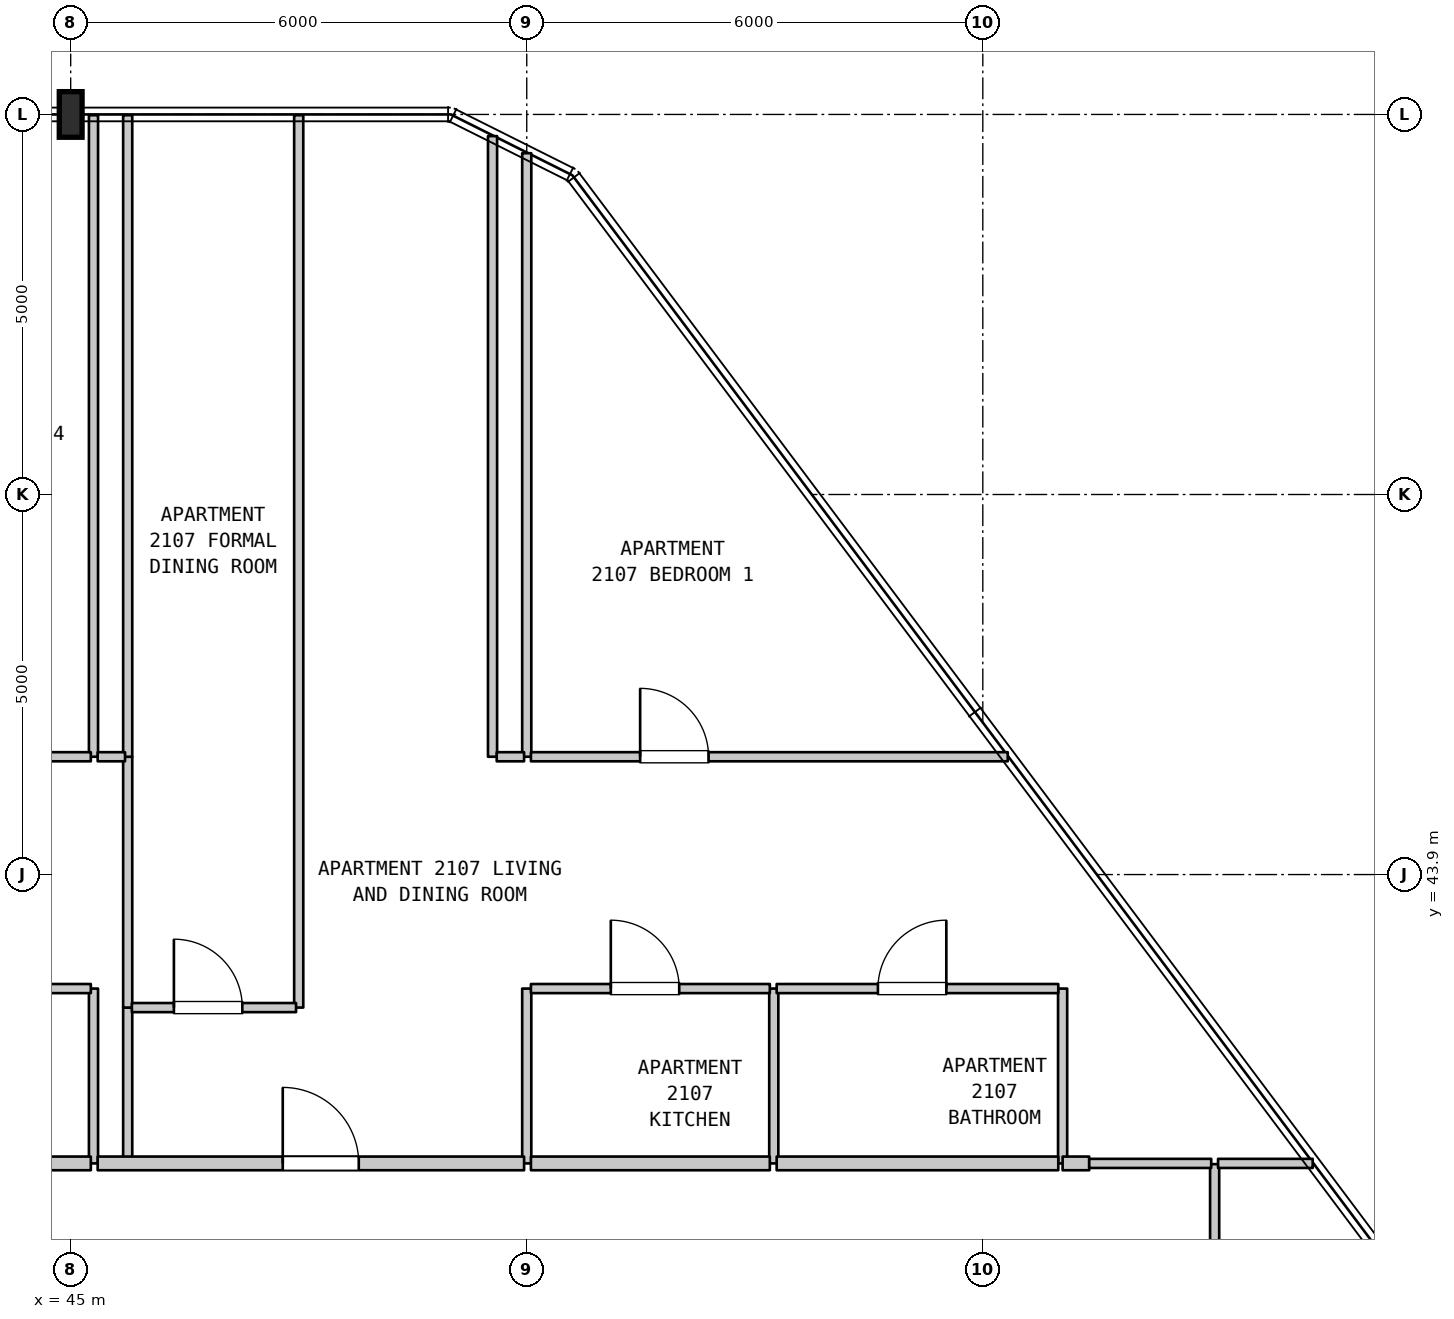
"""IFC4 building model, lengths in metres.
Left out: names, types, materials, properties, quantities, classifications, styles, units other than length and angle.
Written with IfcOpenShell. Run it as: python <this file> out.ifc"""

import sys

from ifc_helpers import new_model, si_unit, direction, frame, frame_2d, origin, origin_2d, place, context, subcontext, project, spatial, rectangle, i_section, extrude, element, fill, save


model = new_model("IFC4")
c1 = context("Model", 3, precision=1e-05, world=origin(), true_north=direction((0.0, 1.0)))
c2 = subcontext(c1, "Body", "Model", "MODEL_VIEW")
j1 = project(units=[si_unit("LENGTHUNIT", "METRE"), si_unit("PLANEANGLEUNIT", "RADIAN")], contexts=[c1])
p1 = place(None, origin())
s1 = spatial("IfcSite", under=j1, at=p1, CompositionType="ELEMENT")
p2 = place(p1, origin())
s2 = spatial("IfcBuilding", under=s1, at=p2, CompositionType="ELEMENT")
p3 = place(p2, frame((0.0, 0.0, 90.9)))
s3 = spatial("IfcBuildingStorey", under=s2, at=p3, CompositionType="ELEMENT", Elevation=90.9)
p4 = place(p3, frame((45.0, 53.9, 0.0), z_axis=(0.0, 0.0, 1.0), x_axis=(1.0, 0.0, 0.0)))
e1 = element("IfcColumn", 1, at=p4, inside=s3, PredefinedType="COLUMN", context=c2, shape_type="SweptSolid", body=[
    extrude(i_section(OverallWidth=0.3, OverallDepth=0.6, WebThickness=0.015, FlangeThickness=0.03, FilletRadius=0.027, at=origin_2d()), origin(), (0.0, 0.0, 1.0), 3.7),
])
p5 = place(p3, frame((45.3, 40.1, 0.0), z_axis=(0.0, 0.0, 1.0), x_axis=(0.0, 1.0, 0.0)))
e2 = element("IfcWall", 2, at=p5, inside=s3, PredefinedType="PARTITIONING", context=c2, shape_type="SweptSolid", body=[
    extrude(rectangle(XDim=2.3, YDim=0.12, at=frame_2d((1.15, 0.0))), origin(), (0.0, 0.0, 1.0), 3.385),
])
p6 = place(p3, frame((45.3, 45.45, 0.0), z_axis=(0.0, 0.0, 1.0), x_axis=(0.0, 1.0, 0.0)))
e3 = element("IfcWall", 3, at=p6, inside=s3, PredefinedType="PARTITIONING", context=c2, shape_type="SweptSolid", body=[
    extrude(rectangle(XDim=8.44, YDim=0.12, at=frame_2d((4.22, 0.0))), origin(), (0.0, 0.0, 1.0), 3.385),
])
p7 = place(p3, frame((45.75, 40.1, 0.0), z_axis=(0.0, 0.0, 1.0), x_axis=(0.0, 1.0, 0.0)))
e4 = element("IfcWall", 4, at=p7, inside=s3, PredefinedType="PARTITIONING", context=c2, shape_type="SweptSolid", body=[
    extrude(rectangle(XDim=2.05, YDim=0.12, at=frame_2d((1.025, 0.0))), origin(), (0.0, 0.0, 1.0), 3.385),
])
p8 = place(p3, frame((45.75, 42.15, 0.0), z_axis=(0.0, 0.0, 1.0), x_axis=(0.0, 1.0, 0.0)))
e5 = element("IfcWall", 5, at=p8, inside=s3, PredefinedType="PARTITIONING", context=c2, shape_type="SweptSolid", body=[
    extrude(rectangle(XDim=3.3, YDim=0.12, at=frame_2d((1.65, 0.0))), origin(), (0.0, 0.0, 1.0), 3.385),
])
p9 = place(p3, frame((45.75, 45.45, 0.0), z_axis=(0.0, 0.0, 1.0), x_axis=(0.0, 1.0, 0.0)))
e6 = element("IfcWall", 6, at=p9, inside=s3, PredefinedType="PARTITIONING", context=c2, shape_type="SweptSolid", body=[
    extrude(rectangle(XDim=8.44, YDim=0.12, at=frame_2d((4.22, 0.0))), origin(), (0.0, 0.0, 1.0), 3.385),
])
p10 = place(p3, frame((48.0, 42.15, 0.0), z_axis=(0.0, 0.0, 1.0), x_axis=(0.0, 1.0, 0.0)))
e7 = element("IfcWall", 7, at=p10, inside=s3, PredefinedType="PARTITIONING", context=c2, shape_type="SweptSolid", body=[
    extrude(rectangle(XDim=11.74, YDim=0.12, at=frame_2d((5.87, 0.0))), origin(), (0.0, 0.0, 1.0), 3.385),
])
p11 = place(p3, frame((50.55, 45.45, 0.0), z_axis=(0.0, 0.0, 1.0), x_axis=(0.0, 1.0, 0.0)))
e8 = element("IfcWall", 8, at=p11, inside=s3, PredefinedType="PARTITIONING", context=c2, shape_type="SweptSolid", body=[
    extrude(rectangle(XDim=8.165, YDim=0.12, at=frame_2d((4.083, 0.0))), origin(), (0.0, 0.0, 1.0), 3.385),
])
p12 = place(p3, frame((51.0, 40.1, 0.0), z_axis=(0.0, 0.0, 1.0), x_axis=(0.0, 1.0, 0.0)))
e9 = element("IfcWall", 9, at=p12, inside=s3, PredefinedType="PARTITIONING", context=c2, shape_type="SweptSolid", body=[
    extrude(rectangle(XDim=2.3, YDim=0.12, at=frame_2d((1.15, 0.0))), origin(), (0.0, 0.0, 1.0), 3.385),
])
p13 = place(p3, frame((51.0, 45.45, 0.0), z_axis=(0.0, 0.0, 1.0), x_axis=(0.0, 1.0, 0.0)))
e10 = element("IfcWall", 10, at=p13, inside=s3, PredefinedType="PARTITIONING", context=c2, shape_type="SweptSolid", body=[
    extrude(rectangle(XDim=7.94, YDim=0.12, at=frame_2d((3.97, 0.0))), origin(), (0.0, 0.0, 1.0), 3.385),
])
for number, where, z_axis, x_axis in (
    (11, (54.25, 40.1, 0.0), (0.0, 0.0, 1.0), (0.0, 1.0, 0.0)),
    (12, (58.05, 40.1, 0.0), (0.0, 0.0, 1.0), (0.0, 1.0, 0.0)),
):
    element("IfcWall", number, at=place(p3, frame(where, z_axis=z_axis, x_axis=x_axis)), inside=s3, PredefinedType="PARTITIONING", context=c2, shape_type="SweptSolid", body=[
        extrude(rectangle(XDim=2.3, YDim=0.12, at=frame_2d((1.15, 0.0))), origin(), (0.0, 0.0, 1.0), 3.385),
    ])
p14 = place(p3, frame((60.05, 37.89, 0.0), z_axis=(0.0, 0.0, 1.0), x_axis=(0.0, 1.0, 0.0)))
e13 = element("IfcWall", 13, at=p14, inside=s3, PredefinedType="PARTITIONING", context=c2, shape_type="SweptSolid", body=[
    extrude(rectangle(XDim=2.2, YDim=0.12, at=frame_2d((1.1, 0.0))), origin(), (0.0, 0.0, 1.0), 3.385),
])
p15 = place(p3, frame((40.311, 40.1, 0.0), z_axis=(0.0, 0.0, 1.0), x_axis=(1.0, 0.0, 0.0)))
e14 = element("IfcWall", 14, at=p15, inside=s3, PredefinedType="STANDARD", context=c2, shape_type="SweptSolid", body=[
    extrude(rectangle(XDim=4.954, YDim=0.18, at=frame_2d((2.477, 0.0))), origin(), (0.0, 0.0, 1.0), 3.385),
])
p16 = place(p3, frame((45.355, 40.1, 0.0), z_axis=(0.0, 0.0, 1.0), x_axis=(1.0, 0.0, 0.0)))
e15 = element("IfcWall", 15, at=p16, inside=s3, PredefinedType="STANDARD", context=c2, shape_type="SweptSolid", body=[
    extrude(rectangle(XDim=5.61, YDim=0.18, at=frame_2d((2.805, 0.0))), origin(), (0.0, 0.0, 1.0), 3.385),
])
p17 = place(p16, frame((2.435, 0.0, 0.0)))
e16 = element("IfcOpeningElement", 16, at=p17, cuts=e15, PredefinedType="OPENING", context=c2, shape_type="SweptSolid", body=[
    extrude(rectangle(XDim=1.0, YDim=2.15, at=frame_2d((0.5, 1.075))), frame((0.0, 0.1, 0.0), z_axis=(0.0, -1.0, 0.0), x_axis=(1.0, 0.0, 0.0)), (0.0, 0.0, 1.0), 0.2),
])
p18 = place(p3, frame((51.055, 40.1, 0.0), z_axis=(0.0, 0.0, 1.0), x_axis=(1.0, 0.0, 0.0)))
e17 = element("IfcWall", 17, at=p18, inside=s3, PredefinedType="STANDARD", context=c2, shape_type="SweptSolid", body=[
    extrude(rectangle(XDim=3.143, YDim=0.18, at=frame_2d((1.572, 0.0))), origin(), (0.0, 0.0, 1.0), 3.385),
])
p19 = place(p3, frame((54.288, 40.1, 0.0), z_axis=(0.0, 0.0, 1.0), x_axis=(1.0, 0.0, 0.0)))
e18 = element("IfcWall", 18, at=p19, inside=s3, PredefinedType="STANDARD", context=c2, shape_type="SweptSolid", body=[
    extrude(rectangle(XDim=3.705, YDim=0.18, at=frame_2d((1.853, 0.0))), origin(), (0.0, 0.0, 1.0), 3.385),
])
p20 = place(p3, frame((58.05, 40.1, 0.0), z_axis=(0.0, 0.0, 1.0), x_axis=(1.0, 0.0, 0.0)))
e19 = element("IfcWall", 19, at=p20, inside=s3, PredefinedType="STANDARD", context=c2, shape_type="SweptSolid", body=[
    extrude(rectangle(XDim=0.35, YDim=0.18, at=frame_2d((0.175, 0.0))), origin(), (0.0, 0.0, 1.0), 3.385),
])
p21 = place(p3, frame((58.4, 40.1, 0.0), z_axis=(0.0, 0.0, 1.0), x_axis=(1.0, 0.0, 0.0)))
e20 = element("IfcWall", 20, at=p21, inside=s3, PredefinedType="PARTITIONING", context=c2, shape_type="SweptSolid", body=[
    extrude(rectangle(XDim=1.605, YDim=0.12, at=frame_2d((0.802, 0.0))), origin(), (0.0, 0.0, 1.0), 3.385),
])
p22 = place(p3, frame((60.095, 40.1, 0.0), z_axis=(0.0, 0.0, 1.0), x_axis=(1.0, 0.0, 0.0)))
e21 = element("IfcWall", 21, at=p22, inside=s3, PredefinedType="PARTITIONING", context=c2, shape_type="SweptSolid", body=[
    extrude(rectangle(XDim=1.245, YDim=0.12, at=frame_2d((0.623, 0.0))), origin(), (0.0, 0.0, 1.0), 3.385),
])
p23 = place(p3, frame((45.805, 42.15, 0.0), z_axis=(0.0, 0.0, 1.0), x_axis=(1.0, 0.0, 0.0)))
e22 = element("IfcWall", 22, at=p23, inside=s3, PredefinedType="PARTITIONING", context=c2, shape_type="SweptSolid", body=[
    extrude(rectangle(XDim=2.16, YDim=0.12, at=frame_2d((1.08, 0.0))), origin(), (0.0, 0.0, 1.0), 3.385),
])
p24 = place(p23, frame((0.553, 0.0, 0.0)))
e23 = element("IfcOpeningElement", 23, at=p24, cuts=e22, PredefinedType="OPENING", context=c2, shape_type="SweptSolid", body=[
    extrude(rectangle(XDim=0.9, YDim=2.15, at=frame_2d((0.45, 1.075))), frame((0.0, 0.07, 0.0), z_axis=(0.0, -1.0, 0.0), x_axis=(1.0, 0.0, 0.0)), (0.0, 0.0, 1.0), 0.14),
])
p25 = place(p3, frame((40.311, 42.4, 0.0), z_axis=(0.0, 0.0, 1.0), x_axis=(1.0, 0.0, 0.0)))
e24 = element("IfcWall", 24, at=p25, inside=s3, PredefinedType="PARTITIONING", context=c2, shape_type="SweptSolid", body=[
    extrude(rectangle(XDim=4.954, YDim=0.12, at=frame_2d((2.477, 0.0))), origin(), (0.0, 0.0, 1.0), 3.385),
])
p26 = place(p25, frame((2.027, 0.0, 0.0)))
e25 = element("IfcOpeningElement", 25, at=p26, cuts=e24, PredefinedType="OPENING", context=c2, shape_type="SweptSolid", body=[
    extrude(rectangle(XDim=0.9, YDim=2.15, at=frame_2d((0.45, 1.075))), frame((0.0, 0.07, 0.0), z_axis=(0.0, -1.0, 0.0), x_axis=(1.0, 0.0, 0.0)), (0.0, 0.0, 1.0), 0.14),
])
p27 = place(p3, frame((51.055, 42.4, 0.0), z_axis=(0.0, 0.0, 1.0), x_axis=(1.0, 0.0, 0.0)))
e26 = element("IfcWall", 26, at=p27, inside=s3, PredefinedType="PARTITIONING", context=c2, shape_type="SweptSolid", body=[
    extrude(rectangle(XDim=3.143, YDim=0.12, at=frame_2d((1.572, 0.0))), origin(), (0.0, 0.0, 1.0), 3.385),
])
p28 = place(p27, frame((1.051, 0.0, 0.0)))
e27 = element("IfcOpeningElement", 27, at=p28, cuts=e26, PredefinedType="OPENING", context=c2, shape_type="SweptSolid", body=[
    extrude(rectangle(XDim=0.9, YDim=2.15, at=frame_2d((0.45, 1.075))), frame((0.0, 0.07, 0.0), z_axis=(0.0, -1.0, 0.0), x_axis=(1.0, 0.0, 0.0)), (0.0, 0.0, 1.0), 0.14),
])
p29 = place(p3, frame((54.288, 42.4, 0.0), z_axis=(0.0, 0.0, 1.0), x_axis=(1.0, 0.0, 0.0)))
e28 = element("IfcWall", 28, at=p29, inside=s3, PredefinedType="PARTITIONING", context=c2, shape_type="SweptSolid", body=[
    extrude(rectangle(XDim=3.705, YDim=0.12, at=frame_2d((1.853, 0.0))), origin(), (0.0, 0.0, 1.0), 3.385),
])
p30 = place(p29, frame((1.332, 0.0, 0.0)))
e29 = element("IfcOpeningElement", 29, at=p30, cuts=e28, PredefinedType="OPENING", context=c2, shape_type="SweptSolid", body=[
    extrude(rectangle(XDim=0.9, YDim=2.1, at=frame_2d((0.45, 1.05))), frame((0.0, 0.07, 0.0), z_axis=(0.0, -1.0, 0.0), x_axis=(1.0, 0.0, 0.0)), (0.0, 0.0, 1.0), 0.14),
])
p31 = place(p3, frame((33.625, 45.45, 0.0), z_axis=(0.0, 0.0, 1.0), x_axis=(1.0, 0.0, 0.0)))
e30 = element("IfcWall", 30, at=p31, inside=s3, PredefinedType="PARTITIONING", context=c2, shape_type="SweptSolid", body=[
    extrude(rectangle(XDim=11.64, YDim=0.12, at=frame_2d((5.82, 0.0))), origin(), (0.0, 0.0, 1.0), 3.385),
])
p32 = place(p31, frame((1.146, 0.0, 0.0)))
e31 = element("IfcOpeningElement", 31, at=p32, cuts=e30, PredefinedType="OPENING", context=c2, shape_type="SweptSolid", body=[
    extrude(rectangle(XDim=0.9, YDim=2.15, at=frame_2d((0.45, 1.075))), frame((0.0, 0.07, 0.0), z_axis=(0.0, -1.0, 0.0), x_axis=(1.0, 0.0, 0.0)), (0.0, 0.0, 1.0), 0.14),
])
p33 = place(p31, frame((3.834, 0.0, 0.0)))
e32 = element("IfcOpeningElement", 32, at=p33, cuts=e30, PredefinedType="OPENING", context=c2, shape_type="SweptSolid", body=[
    extrude(rectangle(XDim=0.9, YDim=2.15, at=frame_2d((0.45, 1.075))), frame((0.0, 0.07, 0.0), z_axis=(0.0, -1.0, 0.0), x_axis=(1.0, 0.0, 0.0)), (0.0, 0.0, 1.0), 0.14),
])
p34 = place(p31, frame((6.766, 0.0, 0.0)))
e33 = element("IfcOpeningElement", 33, at=p34, cuts=e30, PredefinedType="OPENING", context=c2, shape_type="SweptSolid", body=[
    extrude(rectangle(XDim=0.9, YDim=2.15, at=frame_2d((0.45, 1.075))), frame((0.0, 0.07, 0.0), z_axis=(0.0, -1.0, 0.0), x_axis=(1.0, 0.0, 0.0)), (0.0, 0.0, 1.0), 0.14),
])
p35 = place(p31, frame((9.594, 0.0, 0.0)))
e34 = element("IfcOpeningElement", 34, at=p35, cuts=e30, PredefinedType="OPENING", context=c2, shape_type="SweptSolid", body=[
    extrude(rectangle(XDim=0.9, YDim=2.15, at=frame_2d((0.45, 1.075))), frame((0.0, 0.07, 0.0), z_axis=(0.0, -1.0, 0.0), x_axis=(1.0, 0.0, 0.0)), (0.0, 0.0, 1.0), 0.14),
])
for number, where, z_axis, x_axis in (
    (35, (45.355, 45.45, 0.0), (0.0, 0.0, 1.0), (1.0, 0.0, 0.0)),
    (36, (50.605, 45.45, 0.0), (0.0, 0.0, 1.0), (1.0, 0.0, 0.0)),
):
    element("IfcWall", number, at=place(p3, frame(where, z_axis=z_axis, x_axis=x_axis)), inside=s3, PredefinedType="PARTITIONING", context=c2, shape_type="SweptSolid", body=[
        extrude(rectangle(XDim=0.36, YDim=0.12, at=frame_2d((0.18, 0.0))), origin(), (0.0, 0.0, 1.0), 3.385),
    ])
p36 = place(p3, frame((51.055, 45.45, 0.0), z_axis=(0.0, 0.0, 1.0), x_axis=(1.0, 0.0, 0.0)))
e37 = element("IfcWall", 37, at=p36, inside=s3, PredefinedType="PARTITIONING", context=c2, shape_type="SweptSolid", body=[
    extrude(rectangle(XDim=6.273, YDim=0.12, at=frame_2d((3.136, 0.0))), origin(), (0.0, 0.0, 1.0), 3.385),
])
p37 = place(p36, frame((1.437, 0.0, 0.0)))
e38 = element("IfcOpeningElement", 38, at=p37, cuts=e37, PredefinedType="OPENING", context=c2, shape_type="SweptSolid", body=[
    extrude(rectangle(XDim=0.9, YDim=2.15, at=frame_2d((0.45, 1.075))), frame((0.0, 0.07, 0.0), z_axis=(0.0, -1.0, 0.0), x_axis=(1.0, 0.0, 0.0)), (0.0, 0.0, 1.0), 0.14),
])
p38 = place(p17, origin())
e39 = element("IfcDoor", 39, at=p38, inside=s3, OperationType="SINGLE_SWING_LEFT", PredefinedType="DOOR", context=c2, shape_type="SweptSolid", body=[
    extrude(rectangle(XDim=1.0, YDim=2.15, at=frame_2d((0.5, 1.075))), frame((0.0, 0.025, 0.0), z_axis=(0.0, -1.0, 0.0), x_axis=(1.0, 0.0, 0.0)), (0.0, 0.0, 1.0), 0.05),
])
fill(e16, e39)
p39 = place(p24, origin())
e40 = element("IfcDoor", 40, at=p39, inside=s3, OperationType="SINGLE_SWING_LEFT", PredefinedType="DOOR", context=c2, shape_type="SweptSolid", body=[
    extrude(rectangle(XDim=0.9, YDim=2.15, at=frame_2d((0.45, 1.075))), frame((0.0, 0.025, 0.0), z_axis=(0.0, -1.0, 0.0), x_axis=(1.0, 0.0, 0.0)), (0.0, 0.0, 1.0), 0.05),
])
fill(e23, e40)
p40 = place(p28, origin())
e41 = element("IfcDoor", 41, at=p40, inside=s3, OperationType="SINGLE_SWING_LEFT", PredefinedType="DOOR", context=c2, shape_type="SweptSolid", body=[
    extrude(rectangle(XDim=0.9, YDim=2.15, at=frame_2d((0.45, 1.075))), frame((0.0, 0.025, 0.0), z_axis=(0.0, -1.0, 0.0), x_axis=(1.0, 0.0, 0.0)), (0.0, 0.0, 1.0), 0.05),
])
fill(e27, e41)
p41 = place(p30, origin())
e42 = element("IfcDoor", 42, at=p41, inside=s3, OperationType="SINGLE_SWING_RIGHT", PredefinedType="DOOR", context=c2, shape_type="SweptSolid", body=[
    extrude(rectangle(XDim=0.9, YDim=2.1, at=frame_2d((0.45, 1.05))), frame((0.0, 0.025, 0.0), z_axis=(0.0, -1.0, 0.0), x_axis=(1.0, 0.0, 0.0)), (0.0, 0.0, 1.0), 0.05),
])
fill(e29, e42)
p42 = place(p37, origin())
e43 = element("IfcDoor", 43, at=p42, inside=s3, OperationType="SINGLE_SWING_LEFT", PredefinedType="DOOR", context=c2, shape_type="SweptSolid", body=[
    extrude(rectangle(XDim=0.9, YDim=2.15, at=frame_2d((0.45, 1.075))), frame((0.0, 0.025, 0.0), z_axis=(0.0, -1.0, 0.0), x_axis=(1.0, 0.0, 0.0)), (0.0, 0.0, 1.0), 0.05),
])
fill(e38, e43)
save(model, sys.argv[1])
